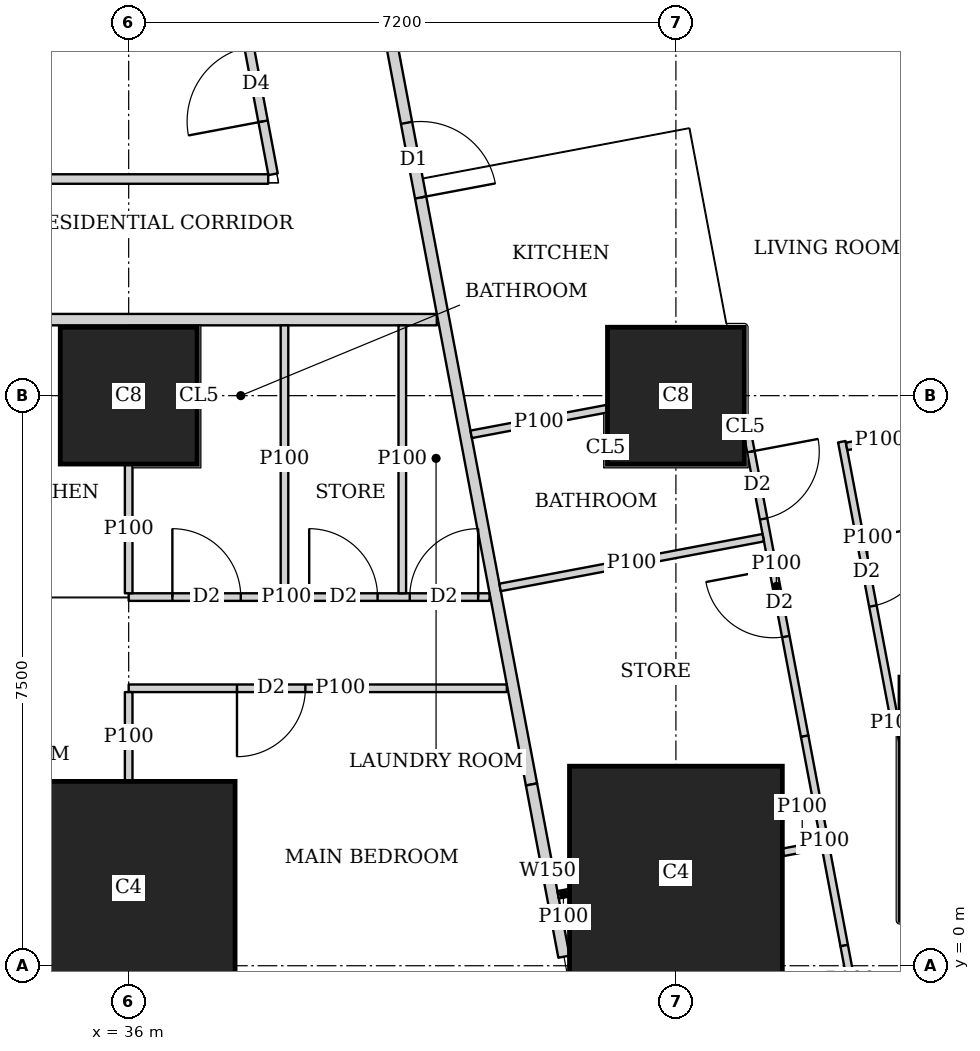
"""IFC4 building model, lengths in metres.
Left out: names, types, materials, properties, quantities, classifications, styles, units other than length and angle.
Written with IfcOpenShell. Run it as: python <this file> out.ifc"""

import sys

from ifc_helpers import new_model, si_unit, direction, frame, frame_2d, origin, origin_2d, place, context, subcontext, project, spatial, rectangle, extrude, element, fill, save


model = new_model("IFC4")
c1 = context("Model", 3, precision=1e-05, world=origin(), true_north=direction((0.0, 1.0)))
c2 = subcontext(c1, "Body", "Model", "MODEL_VIEW")
j1 = project(units=[si_unit("LENGTHUNIT", "METRE"), si_unit("PLANEANGLEUNIT", "RADIAN")], contexts=[c1])
p1 = place(None, origin())
s1 = spatial("IfcSite", under=j1, at=p1, CompositionType="ELEMENT")
p2 = place(p1, origin())
s2 = spatial("IfcBuilding", under=s1, at=p2, CompositionType="ELEMENT")
p3 = place(p2, frame((0.0, 0.0, 65.0)))
s3 = spatial("IfcBuildingStorey", under=s2, at=p3, CompositionType="ELEMENT", Elevation=65.0)
for number, where, z_axis, x_axis in (
    (1, (36.0, 1.025, 0.0), (0.0, 0.0, 1.0), (1.0, 0.0, 0.0)),
    (2, (43.2, 1.225, 0.0), (0.0, 0.0, 1.0), (1.0, 0.0, 0.0)),
):
    element("IfcColumn", number, at=place(p3, frame(where, z_axis=z_axis, x_axis=x_axis)), inside=s3, PredefinedType="COLUMN", context=c2, shape_type="SweptSolid", body=[
        extrude(rectangle(XDim=2.8, YDim=2.8, at=origin_2d()), origin(), (0.0, 0.0, 1.0), 3.75),
    ])
p4 = place(p3, frame((47.748, 2.197, 0.0), z_axis=(0.0, 0.0, 1.0), x_axis=(1.0, 0.0, 0.0)))
e3 = element("IfcColumn", 3, at=p4, inside=s3, PredefinedType="COLUMN", context=c2, shape_type="SweptSolid", body=[
    extrude(rectangle(XDim=3.2, YDim=3.2, at=origin_2d()), origin(), (0.0, 0.0, 1.0), 3.75),
])
for number, where, z_axis, x_axis in (
    (4, (36.0, 7.5, 0.0), (0.0, 0.0, 1.0), (1.0, 0.0, 0.0)),
    (5, (43.2, 7.5, 0.0), (0.0, 0.0, 1.0), (1.0, 0.0, 0.0)),
):
    element("IfcColumn", number, at=place(p3, frame(where, z_axis=z_axis, x_axis=x_axis)), inside=s3, PredefinedType="COLUMN", context=c2, shape_type="SweptSolid", body=[
        extrude(rectangle(XDim=1.8, YDim=1.8, at=origin_2d()), origin(), (0.0, 0.0, 1.0), 3.75),
    ])
p5 = place(p3, frame((50.653, 2.703, 0.0), z_axis=(0.0, 0.0, 1.0), x_axis=(-0.185612026696, 0.982623109613, 0.0)))
e6 = element("IfcWall", 6, at=p5, inside=s3, PredefinedType="SOLIDWALL", context=c2, shape_type="SweptSolid", body=[
    extrude(rectangle(XDim=41.393, YDim=0.2, at=frame_2d((20.697, 0.0))), origin(), (0.0, 0.0, 1.0), 3.5),
])
p6 = place(p5, frame((1.633, 0.0, 0.9)))
e7 = element("IfcOpeningElement", 7, at=p6, cuts=e6, PredefinedType="OPENING", context=c2, shape_type="SweptSolid", body=[
    extrude(rectangle(XDim=1.8, YDim=1.5, at=frame_2d((0.9, 0.75))), frame((0.0, 0.11, 0.0), z_axis=(0.0, -1.0, 0.0), x_axis=(1.0, 0.0, 0.0)), (0.0, 0.0, 1.0), 0.22),
])
p7 = place(p5, frame((6.032, 0.0, 0.9)))
e8 = element("IfcOpeningElement", 8, at=p7, cuts=e6, PredefinedType="OPENING", context=c2, shape_type="SweptSolid", body=[
    extrude(rectangle(XDim=1.8, YDim=1.5, at=frame_2d((0.9, 0.75))), frame((0.0, 0.11, 0.0), z_axis=(0.0, -1.0, 0.0), x_axis=(1.0, 0.0, 0.0)), (0.0, 0.0, 1.0), 0.22),
])
p8 = place(p5, frame((9.848, 0.0, 0.9)))
e9 = element("IfcOpeningElement", 9, at=p8, cuts=e6, PredefinedType="OPENING", context=c2, shape_type="SweptSolid", body=[
    extrude(rectangle(XDim=1.8, YDim=1.5, at=frame_2d((0.9, 0.75))), frame((0.0, 0.11, 0.0), z_axis=(0.0, -1.0, 0.0), x_axis=(1.0, 0.0, 0.0)), (0.0, 0.0, 1.0), 0.22),
])
p9 = place(p5, frame((17.481, 0.0, 0.9)))
e10 = element("IfcOpeningElement", 10, at=p9, cuts=e6, PredefinedType="OPENING", context=c2, shape_type="SweptSolid", body=[
    extrude(rectangle(XDim=1.8, YDim=1.5, at=frame_2d((0.9, 0.75))), frame((0.0, 0.11, 0.0), z_axis=(0.0, -1.0, 0.0), x_axis=(1.0, 0.0, 0.0)), (0.0, 0.0, 1.0), 0.22),
])
p10 = place(p5, frame((21.297, 0.0, 0.9)))
e11 = element("IfcOpeningElement", 11, at=p10, cuts=e6, PredefinedType="OPENING", context=c2, shape_type="SweptSolid", body=[
    extrude(rectangle(XDim=1.8, YDim=1.5, at=frame_2d((0.9, 0.75))), frame((0.0, 0.11, 0.0), z_axis=(0.0, -1.0, 0.0), x_axis=(1.0, 0.0, 0.0)), (0.0, 0.0, 1.0), 0.22),
])
p11 = place(p5, frame((25.113, 0.0, 0.9)))
e12 = element("IfcOpeningElement", 12, at=p11, cuts=e6, PredefinedType="OPENING", context=c2, shape_type="SweptSolid", body=[
    extrude(rectangle(XDim=1.8, YDim=1.5, at=frame_2d((0.9, 0.75))), frame((0.0, 0.11, 0.0), z_axis=(0.0, -1.0, 0.0), x_axis=(1.0, 0.0, 0.0)), (0.0, 0.0, 1.0), 0.22),
])
p12 = place(p5, frame((28.93, 0.0, 0.9)))
e13 = element("IfcOpeningElement", 13, at=p12, cuts=e6, PredefinedType="OPENING", context=c2, shape_type="SweptSolid", body=[
    extrude(rectangle(XDim=1.8, YDim=1.5, at=frame_2d((0.9, 0.75))), frame((0.0, 0.11, 0.0), z_axis=(0.0, -1.0, 0.0), x_axis=(1.0, 0.0, 0.0)), (0.0, 0.0, 1.0), 0.22),
])
p13 = place(p5, frame((32.746, 0.0, 0.9)))
e14 = element("IfcOpeningElement", 14, at=p13, cuts=e6, PredefinedType="OPENING", context=c2, shape_type="SweptSolid", body=[
    extrude(rectangle(XDim=1.8, YDim=1.5, at=frame_2d((0.9, 0.75))), frame((0.0, 0.11, 0.0), z_axis=(0.0, -1.0, 0.0), x_axis=(1.0, 0.0, 0.0)), (0.0, 0.0, 1.0), 0.22),
])
p14 = place(p5, frame((36.481, 0.0, 0.9)))
e15 = element("IfcOpeningElement", 15, at=p14, cuts=e6, PredefinedType="OPENING", context=c2, shape_type="SweptSolid", body=[
    extrude(rectangle(XDim=1.8, YDim=1.5, at=frame_2d((0.9, 0.75))), frame((0.0, 0.11, 0.0), z_axis=(0.0, -1.0, 0.0), x_axis=(1.0, 0.0, 0.0)), (0.0, 0.0, 1.0), 0.22),
])
p15 = place(p3, frame((40.054, 8.5, 0.0), z_axis=(0.0, 0.0, 1.0), x_axis=(-1.0, 0.0, 0.0)))
e16 = element("IfcWall", 16, at=p15, inside=s3, PredefinedType="SOLIDWALL", context=c2, shape_type="SweptSolid", body=[
    extrude(rectangle(XDim=31.704, YDim=0.15, at=frame_2d((15.852, 0.0))), origin(), (0.0, 0.0, 1.0), 3.5),
])
p16 = place(p15, frame((28.104, 0.0, 0.0)))
e17 = element("IfcOpeningElement", 17, at=p16, cuts=e16, PredefinedType="OPENING", context=c2, shape_type="SweptSolid", body=[
    extrude(rectangle(XDim=1.0, YDim=2.1, at=frame_2d((0.5, 1.05))), frame((0.0, 0.085, 0.0), z_axis=(0.0, -1.0, 0.0), x_axis=(1.0, 0.0, 0.0)), (0.0, 0.0, 1.0), 0.17),
])
p17 = place(p15, frame((19.755, 0.0, 0.0)))
e18 = element("IfcOpeningElement", 18, at=p17, cuts=e16, PredefinedType="OPENING", context=c2, shape_type="SweptSolid", body=[
    extrude(rectangle(XDim=1.0, YDim=2.1, at=frame_2d((0.5, 1.05))), frame((0.0, 0.085, 0.0), z_axis=(0.0, -1.0, 0.0), x_axis=(1.0, 0.0, 0.0)), (0.0, 0.0, 1.0), 0.17),
])
p18 = place(p15, frame((12.555, 0.0, 0.0)))
e19 = element("IfcOpeningElement", 19, at=p18, cuts=e16, PredefinedType="OPENING", context=c2, shape_type="SweptSolid", body=[
    extrude(rectangle(XDim=1.0, YDim=2.1, at=frame_2d((0.5, 1.05))), frame((0.0, 0.085, 0.0), z_axis=(0.0, -1.0, 0.0), x_axis=(1.0, 0.0, 0.0)), (0.0, 0.0, 1.0), 0.17),
])
p19 = place(p15, frame((5.355, 0.0, 0.0)))
e20 = element("IfcOpeningElement", 20, at=p19, cuts=e16, PredefinedType="OPENING", context=c2, shape_type="SweptSolid", body=[
    extrude(rectangle(XDim=1.0, YDim=2.1, at=frame_2d((0.5, 1.05))), frame((0.0, 0.085, 0.0), z_axis=(0.0, -1.0, 0.0), x_axis=(1.0, 0.0, 0.0)), (0.0, 0.0, 1.0), 0.17),
])
p20 = place(p3, frame((33.68, 42.723, 0.0), z_axis=(0.0, 0.0, 1.0), x_axis=(0.185624129307, -0.98262082342, 0.0)))
e21 = element("IfcWall", 21, at=p20, inside=s3, PredefinedType="SOLIDWALL", context=c2, shape_type="SweptSolid", body=[
    extrude(rectangle(XDim=41.051, YDim=0.15, at=frame_2d((20.526, 0.0))), origin(), (0.0, 0.0, 1.0), 2.5),
])
p21 = place(p20, frame((13.577, 0.0, 0.0)))
e22 = element("IfcOpeningElement", 22, at=p21, cuts=e21, PredefinedType="OPENING", context=c2, shape_type="SweptSolid", body=[
    extrude(rectangle(XDim=1.0, YDim=2.1, at=frame_2d((0.5, 1.05))), frame((0.0, 0.085, 0.0), z_axis=(0.0, -1.0, 0.0), x_axis=(1.0, 0.0, 0.0)), (0.0, 0.0, 1.0), 0.17),
])
p22 = place(p20, frame((17.394, 0.0, 0.0)))
e23 = element("IfcOpeningElement", 23, at=p22, cuts=e21, PredefinedType="OPENING", context=c2, shape_type="SweptSolid", body=[
    extrude(rectangle(XDim=1.0, YDim=2.1, at=frame_2d((0.5, 1.05))), frame((0.0, 0.085, 0.0), z_axis=(0.0, -1.0, 0.0), x_axis=(1.0, 0.0, 0.0)), (0.0, 0.0, 1.0), 0.17),
])
p23 = place(p20, frame((26.758, 0.0, 0.0)))
e24 = element("IfcOpeningElement", 24, at=p23, cuts=e21, PredefinedType="OPENING", context=c2, shape_type="SweptSolid", body=[
    extrude(rectangle(XDim=1.0, YDim=2.1, at=frame_2d((0.5, 1.05))), frame((0.0, 0.085, 0.0), z_axis=(0.0, -1.0, 0.0), x_axis=(1.0, 0.0, 0.0)), (0.0, 0.0, 1.0), 0.17),
])
p24 = place(p20, frame((32.193, 0.0, 0.0)))
e25 = element("IfcOpeningElement", 25, at=p24, cuts=e21, PredefinedType="OPENING", context=c2, shape_type="SweptSolid", body=[
    extrude(rectangle(XDim=1.0, YDim=2.1, at=frame_2d((0.5, 1.05))), frame((0.0, 0.085, 0.0), z_axis=(0.0, -1.0, 0.0), x_axis=(1.0, 0.0, 0.0)), (0.0, 0.0, 1.0), 0.17),
])
p25 = place(p3, frame((41.3, 2.385, 0.0), z_axis=(0.0, 0.0, 1.0), x_axis=(0.185170596553, -0.982706390624, 0.0)))
e26 = element("IfcWall", 26, at=p25, inside=s3, PredefinedType="SOLIDWALL", context=c2, shape_type="SweptSolid", body=[
    extrude(rectangle(XDim=2.306, YDim=0.15, at=frame_2d((1.153, 0.0))), origin(), (0.0, 0.0, 1.0), 2.05),
])
p26 = place(p3, frame((40.975, 3.65, 0.0), z_axis=(0.0, 0.0, 1.0), x_axis=(-1.0, 0.0, 0.0)))
e27 = element("IfcWall", 27, at=p26, inside=s3, PredefinedType="PARTITIONING", context=c2, shape_type="SweptSolid", body=[
    extrude(rectangle(XDim=4.975, YDim=0.1, at=frame_2d((2.488, 0.0))), origin(), (0.0, 0.0, 1.0), 3.5),
])
p27 = place(p26, frame((2.65, 0.0, 0.0)))
e28 = element("IfcOpeningElement", 28, at=p27, cuts=e27, PredefinedType="OPENING", context=c2, shape_type="SweptSolid", body=[
    extrude(rectangle(XDim=0.9, YDim=2.1, at=frame_2d((0.45, 1.05))), frame((0.0, 0.06, 0.0), z_axis=(0.0, -1.0, 0.0), x_axis=(1.0, 0.0, 0.0)), (0.0, 0.0, 1.0), 0.12),
])
p28 = place(p3, frame((40.748, 4.85, 0.0), z_axis=(0.0, 0.0, 1.0), x_axis=(-1.0, 0.0, 0.0)))
e29 = element("IfcWall", 29, at=p28, inside=s3, PredefinedType="PARTITIONING", context=c2, shape_type="SweptSolid", body=[
    extrude(rectangle(XDim=4.748, YDim=0.1, at=frame_2d((2.374, 0.0))), origin(), (0.0, 0.0, 1.0), 3.5),
])
p29 = place(p28, frame((3.273, 0.0, 0.0)))
e30 = element("IfcOpeningElement", 30, at=p29, cuts=e29, PredefinedType="OPENING", context=c2, shape_type="SweptSolid", body=[
    extrude(rectangle(XDim=0.9, YDim=2.1, at=frame_2d((0.45, 1.05))), frame((0.0, 0.06, 0.0), z_axis=(0.0, -1.0, 0.0), x_axis=(1.0, 0.0, 0.0)), (0.0, 0.0, 1.0), 0.12),
])
p30 = place(p28, frame((0.15, 0.0, 0.0)))
e31 = element("IfcOpeningElement", 31, at=p30, cuts=e29, PredefinedType="OPENING", context=c2, shape_type="SweptSolid", body=[
    extrude(rectangle(XDim=0.9, YDim=2.1, at=frame_2d((0.45, 1.05))), frame((0.0, 0.06, 0.0), z_axis=(0.0, -1.0, 0.0), x_axis=(1.0, 0.0, 0.0)), (0.0, 0.0, 1.0), 0.12),
])
p31 = place(p28, frame((1.473, 0.0, 0.0)))
e32 = element("IfcOpeningElement", 32, at=p31, cuts=e29, PredefinedType="OPENING", context=c2, shape_type="SweptSolid", body=[
    extrude(rectangle(XDim=0.9, YDim=2.1, at=frame_2d((0.45, 1.05))), frame((0.0, 0.06, 0.0), z_axis=(0.0, -1.0, 0.0), x_axis=(1.0, 0.0, 0.0)), (0.0, 0.0, 1.0), 0.12),
])
p32 = place(p3, frame((36.0, 2.426, 0.0), z_axis=(0.0, 0.0, 1.0), x_axis=(0.0, 1.0, 0.0)))
e33 = element("IfcWall", 33, at=p32, inside=s3, PredefinedType="PARTITIONING", context=c2, shape_type="SweptSolid", body=[
    extrude(rectangle(XDim=1.174, YDim=0.1, at=frame_2d((0.587, 0.0))), origin(), (0.0, 0.0, 1.0), 3.5),
])
p33 = place(p3, frame((36.0, 4.9, 0.0), z_axis=(0.0, 0.0, 1.0), x_axis=(0.0, 1.0, 0.0)))
e34 = element("IfcWall", 34, at=p33, inside=s3, PredefinedType="PARTITIONING", context=c2, shape_type="SweptSolid", body=[
    extrude(rectangle(XDim=1.699, YDim=0.1, at=frame_2d((0.85, 0.0))), origin(), (0.0, 0.0, 1.0), 3.5),
])
for number, where, z_axis, x_axis in (
    (35, (39.6, 4.9, 0.0), (0.0, 0.0, 1.0), (0.0, 1.0, 0.0)),
    (36, (38.05, 4.9, 0.0), (0.0, 0.0, 1.0), (0.0, 1.0, 0.0)),
):
    element("IfcWall", number, at=place(p3, frame(where, z_axis=z_axis, x_axis=x_axis)), inside=s3, PredefinedType="PARTITIONING", context=c2, shape_type="SweptSolid", body=[
        extrude(rectangle(XDim=3.525, YDim=0.1, at=frame_2d((1.763, 0.0))), origin(), (0.0, 0.0, 1.0), 3.5),
    ])
p34 = place(p3, frame((45.383, 6.894, 0.0), z_axis=(0.0, 0.0, 1.0), x_axis=(0.185791461635, -0.982589198385, 0.0)))
e37 = element("IfcWall", 37, at=p34, inside=s3, PredefinedType="PARTITIONING", context=c2, shape_type="SweptSolid", body=[
    extrude(rectangle(XDim=3.687, YDim=0.1, at=frame_2d((1.844, 0.0))), origin(), (0.0, 0.0, 1.0), 3.5),
])
p35 = place(p34, frame((1.3, 0.0, 0.0)))
e38 = element("IfcOpeningElement", 38, at=p35, cuts=e37, PredefinedType="OPENING", context=c2, shape_type="SweptSolid", body=[
    extrude(rectangle(XDim=0.9, YDim=2.1, at=frame_2d((0.45, 1.05))), frame((0.0, 0.06, 0.0), z_axis=(0.0, -1.0, 0.0), x_axis=(1.0, 0.0, 0.0)), (0.0, 0.0, 1.0), 0.12),
])
p36 = place(p3, frame((46.068, 3.271, 0.0), z_axis=(0.0, 0.0, 1.0), x_axis=(0.183590240121, -0.98300286049, 0.0)))
e39 = element("IfcWall", 39, at=p36, inside=s3, PredefinedType="PARTITIONING", context=c2, shape_type="SweptSolid", body=[
    extrude(rectangle(XDim=0.169, YDim=0.1, at=frame_2d((0.084, 0.0))), origin(), (0.0, 0.0, 1.0), 2.05),
])
p37 = place(p3, frame((44.149, 6.96, 0.0), z_axis=(0.0, 0.0, 1.0), x_axis=(0.185824941804, -0.982582867245, 0.0)))
e40 = element("IfcWall", 40, at=p37, inside=s3, PredefinedType="PARTITIONING", context=c2, shape_type="SweptSolid", body=[
    extrude(rectangle(XDim=4.01, YDim=0.1, at=frame_2d((2.005, 0.0))), origin(), (0.0, 0.0, 1.0), 3.5),
])
p38 = place(p37, frame((0.2, 0.0, 0.0)))
e41 = element("IfcOpeningElement", 41, at=p38, cuts=e40, PredefinedType="OPENING", context=c2, shape_type="SweptSolid", body=[
    extrude(rectangle(XDim=0.9, YDim=2.1, at=frame_2d((0.45, 1.05))), frame((0.0, 0.06, 0.0), z_axis=(0.0, -1.0, 0.0), x_axis=(1.0, 0.0, 0.0)), (0.0, 0.0, 1.0), 0.12),
])
p39 = place(p37, frame((1.776, 0.0, 0.0)))
e42 = element("IfcOpeningElement", 42, at=p39, cuts=e40, PredefinedType="OPENING", context=c2, shape_type="SweptSolid", body=[
    extrude(rectangle(XDim=0.9, YDim=2.1, at=frame_2d((0.45, 1.05))), frame((0.0, 0.06, 0.0), z_axis=(0.0, -1.0, 0.0), x_axis=(1.0, 0.0, 0.0)), (0.0, 0.0, 1.0), 0.12),
])
p40 = place(p3, frame((44.894, 3.02, 0.0), z_axis=(0.0, 0.0, 1.0), x_axis=(0.185471317237, -0.982649678412, 0.0)))
e43 = element("IfcWall", 43, at=p40, inside=s3, PredefinedType="PARTITIONING", context=c2, shape_type="SweptSolid", body=[
    extrude(rectangle(XDim=2.804, YDim=0.1, at=frame_2d((1.402, 0.0))), origin(), (0.0, 0.0, 1.0), 2.05),
])
p41 = place(p3, frame((45.414, 0.265, 0.0), z_axis=(0.0, 0.0, 1.0), x_axis=(0.185665855771, -0.982612940074, 0.0)))
e44 = element("IfcWall", 44, at=p41, inside=s3, PredefinedType="PARTITIONING", context=c2, shape_type="SweptSolid", body=[
    extrude(rectangle(XDim=0.931, YDim=0.1, at=frame_2d((0.465, 0.0))), origin(), (0.0, 0.0, 1.0), 3.5),
])
p42 = place(p3, frame((46.32, 6.997, 0.0), z_axis=(0.0, 0.0, 1.0), x_axis=(-0.982635224332, -0.185547880349, 0.0)))
e45 = element("IfcWall", 45, at=p42, inside=s3, PredefinedType="PARTITIONING", context=c2, shape_type="SweptSolid", body=[
    extrude(rectangle(XDim=0.889, YDim=0.1, at=frame_2d((0.445, 0.0))), origin(), (0.0, 0.0, 1.0), 3.5),
])
p43 = place(p3, frame((42.29, 7.328, 0.0), z_axis=(0.0, 0.0, 1.0), x_axis=(-0.98262927905, -0.185579362952, 0.0)))
e46 = element("IfcWall", 46, at=p43, inside=s3, PredefinedType="PARTITIONING", context=c2, shape_type="SweptSolid", body=[
    extrude(rectangle(XDim=1.815, YDim=0.1, at=frame_2d((0.908, 0.0))), origin(), (0.0, 0.0, 1.0), 3.5),
])
p44 = place(p3, frame((45.114, 1.587, 0.0), z_axis=(0.0, 0.0, 1.0), x_axis=(-0.982699277433, -0.185208342501, 0.0)))
e47 = element("IfcWall", 47, at=p44, inside=s3, PredefinedType="PARTITIONING", context=c2, shape_type="SweptSolid", body=[
    extrude(rectangle(XDim=0.513, YDim=0.1, at=frame_2d((0.256, 0.0))), origin(), (0.0, 0.0, 1.0), 2.05),
])
p45 = place(p3, frame((41.79, 0.959, 0.0), z_axis=(0.0, 0.0, 1.0), x_axis=(-0.983372768072, -0.181598455428, 0.0)))
e48 = element("IfcWall", 48, at=p45, inside=s3, PredefinedType="PARTITIONING", context=c2, shape_type="SweptSolid", body=[
    extrude(rectangle(XDim=0.143, YDim=0.1, at=frame_2d((0.071, 0.0))), origin(), (0.0, 0.0, 1.0), 2.05),
])
p46 = place(p3, frame((44.349, 5.631, 0.0), z_axis=(0.0, 0.0, 1.0), x_axis=(-0.982629014545, -0.18558076348, 0.0)))
e49 = element("IfcWall", 49, at=p46, inside=s3, PredefinedType="PARTITIONING", context=c2, shape_type="SweptSolid", body=[
    extrude(rectangle(XDim=3.524, YDim=0.1, at=frame_2d((1.762, 0.0))), origin(), (0.0, 0.0, 1.0), 3.5),
])
p47 = place(p3, frame((28.95, 10.35, 0.0), z_axis=(0.0, 0.0, 1.0), x_axis=(1.0, 0.0, 0.0)))
e50 = element("IfcWall", 50, at=p47, inside=s3, PredefinedType="PARTITIONING", context=c2, shape_type="SweptSolid", body=[
    extrude(rectangle(XDim=8.886, YDim=0.125, at=frame_2d((4.443, 0.0))), origin(), (0.0, 0.0, 1.0), 3.5),
])
p48 = place(p3, frame((37.9, 10.413, 0.0), z_axis=(0.0, 0.0, 1.0), x_axis=(-0.185527510388, 0.982639070508, 0.0)))
e51 = element("IfcWall", 51, at=p48, inside=s3, PredefinedType="PARTITIONING", context=c2, shape_type="SweptSolid", body=[
    extrude(rectangle(XDim=5.056, YDim=0.125, at=frame_2d((2.528, 0.0))), origin(), (0.0, 0.0, 1.0), 3.5),
])
p49 = place(p48, frame((0.708, 0.0, 0.0)))
e52 = element("IfcOpeningElement", 52, at=p49, cuts=e51, PredefinedType="OPENING", context=c2, shape_type="SweptSolid", body=[
    extrude(rectangle(XDim=1.0, YDim=2.1, at=frame_2d((0.5, 1.05))), frame((0.0, 0.073, 0.0), z_axis=(0.0, -1.0, 0.0), x_axis=(1.0, 0.0, 0.0)), (0.0, 0.0, 1.0), 0.145),
])
p50 = place(p27, origin())
e53 = element("IfcDoor", 53, at=p50, inside=s3, OperationType="SINGLE_SWING_RIGHT", PredefinedType="DOOR", context=c2, shape_type="SweptSolid", body=[
    extrude(rectangle(XDim=0.9, YDim=2.1, at=frame_2d((0.45, 1.05))), frame((0.0, 0.025, 0.0), z_axis=(0.0, -1.0, 0.0), x_axis=(1.0, 0.0, 0.0)), (0.0, 0.0, 1.0), 0.05),
])
fill(e28, e53)
p51 = place(p29, origin())
e54 = element("IfcDoor", 54, at=p51, inside=s3, OperationType="SINGLE_SWING_LEFT", PredefinedType="DOOR", context=c2, shape_type="SweptSolid", body=[
    extrude(rectangle(XDim=0.9, YDim=2.1, at=frame_2d((0.45, 1.05))), frame((0.0, 0.025, 0.0), z_axis=(0.0, -1.0, 0.0), x_axis=(1.0, 0.0, 0.0)), (0.0, 0.0, 1.0), 0.05),
])
fill(e30, e54)
p52 = place(p30, origin())
e55 = element("IfcDoor", 55, at=p52, inside=s3, OperationType="SINGLE_SWING_RIGHT", PredefinedType="DOOR", context=c2, shape_type="SweptSolid", body=[
    extrude(rectangle(XDim=0.9, YDim=2.1, at=frame_2d((0.45, 1.05))), frame((0.0, 0.025, 0.0), z_axis=(0.0, -1.0, 0.0), x_axis=(1.0, 0.0, 0.0)), (0.0, 0.0, 1.0), 0.05),
])
fill(e31, e55)
p53 = place(p31, origin())
e56 = element("IfcDoor", 56, at=p53, inside=s3, OperationType="SINGLE_SWING_LEFT", PredefinedType="DOOR", context=c2, shape_type="SweptSolid", body=[
    extrude(rectangle(XDim=0.9, YDim=2.1, at=frame_2d((0.45, 1.05))), frame((0.0, 0.025, 0.0), z_axis=(0.0, -1.0, 0.0), x_axis=(1.0, 0.0, 0.0)), (0.0, 0.0, 1.0), 0.05),
])
fill(e32, e56)
p54 = place(p35, origin())
e57 = element("IfcDoor", 57, at=p54, inside=s3, OperationType="SINGLE_SWING_LEFT", PredefinedType="DOOR", context=c2, shape_type="SweptSolid", body=[
    extrude(rectangle(XDim=0.9, YDim=2.1, at=frame_2d((0.45, 1.05))), frame((0.0, 0.025, 0.0), z_axis=(0.0, -1.0, 0.0), x_axis=(1.0, 0.0, 0.0)), (0.0, 0.0, 1.0), 0.05),
])
fill(e38, e57)
p55 = place(p38, origin())
e58 = element("IfcDoor", 58, at=p55, inside=s3, OperationType="SINGLE_SWING_LEFT", PredefinedType="DOOR", context=c2, shape_type="SweptSolid", body=[
    extrude(rectangle(XDim=0.9, YDim=2.1, at=frame_2d((0.45, 1.05))), frame((0.0, 0.025, 0.0), z_axis=(0.0, -1.0, 0.0), x_axis=(1.0, 0.0, 0.0)), (0.0, 0.0, 1.0), 0.05),
])
fill(e41, e58)
p56 = place(p39, origin())
e59 = element("IfcDoor", 59, at=p56, inside=s3, OperationType="SINGLE_SWING_RIGHT", PredefinedType="DOOR", context=c2, shape_type="SweptSolid", body=[
    extrude(rectangle(XDim=0.9, YDim=2.1, at=frame_2d((0.45, 1.05))), frame((0.0, 0.025, 0.0), z_axis=(0.0, -1.0, 0.0), x_axis=(1.0, 0.0, 0.0)), (0.0, 0.0, 1.0), 0.05),
])
fill(e42, e59)
p57 = place(p24, origin())
e60 = element("IfcDoor", 60, at=p57, inside=s3, OperationType="SINGLE_SWING_RIGHT", PredefinedType="DOOR", context=c2, shape_type="SweptSolid", body=[
    extrude(rectangle(XDim=1.0, YDim=2.1, at=frame_2d((0.5, 1.05))), frame((0.0, 0.025, 0.0), z_axis=(0.0, -1.0, 0.0), x_axis=(1.0, 0.0, 0.0)), (0.0, 0.0, 1.0), 0.05),
])
fill(e25, e60)
p58 = place(p49, origin())
e61 = element("IfcDoor", 61, at=p58, inside=s3, OperationType="SINGLE_SWING_LEFT", PredefinedType="DOOR", context=c2, shape_type="SweptSolid", body=[
    extrude(rectangle(XDim=1.0, YDim=2.1, at=frame_2d((0.5, 1.05))), frame((0.0, 0.025, 0.0), z_axis=(0.0, -1.0, 0.0), x_axis=(1.0, 0.0, 0.0)), (0.0, 0.0, 1.0), 0.05),
])
fill(e52, e61)
save(model, sys.argv[1])
